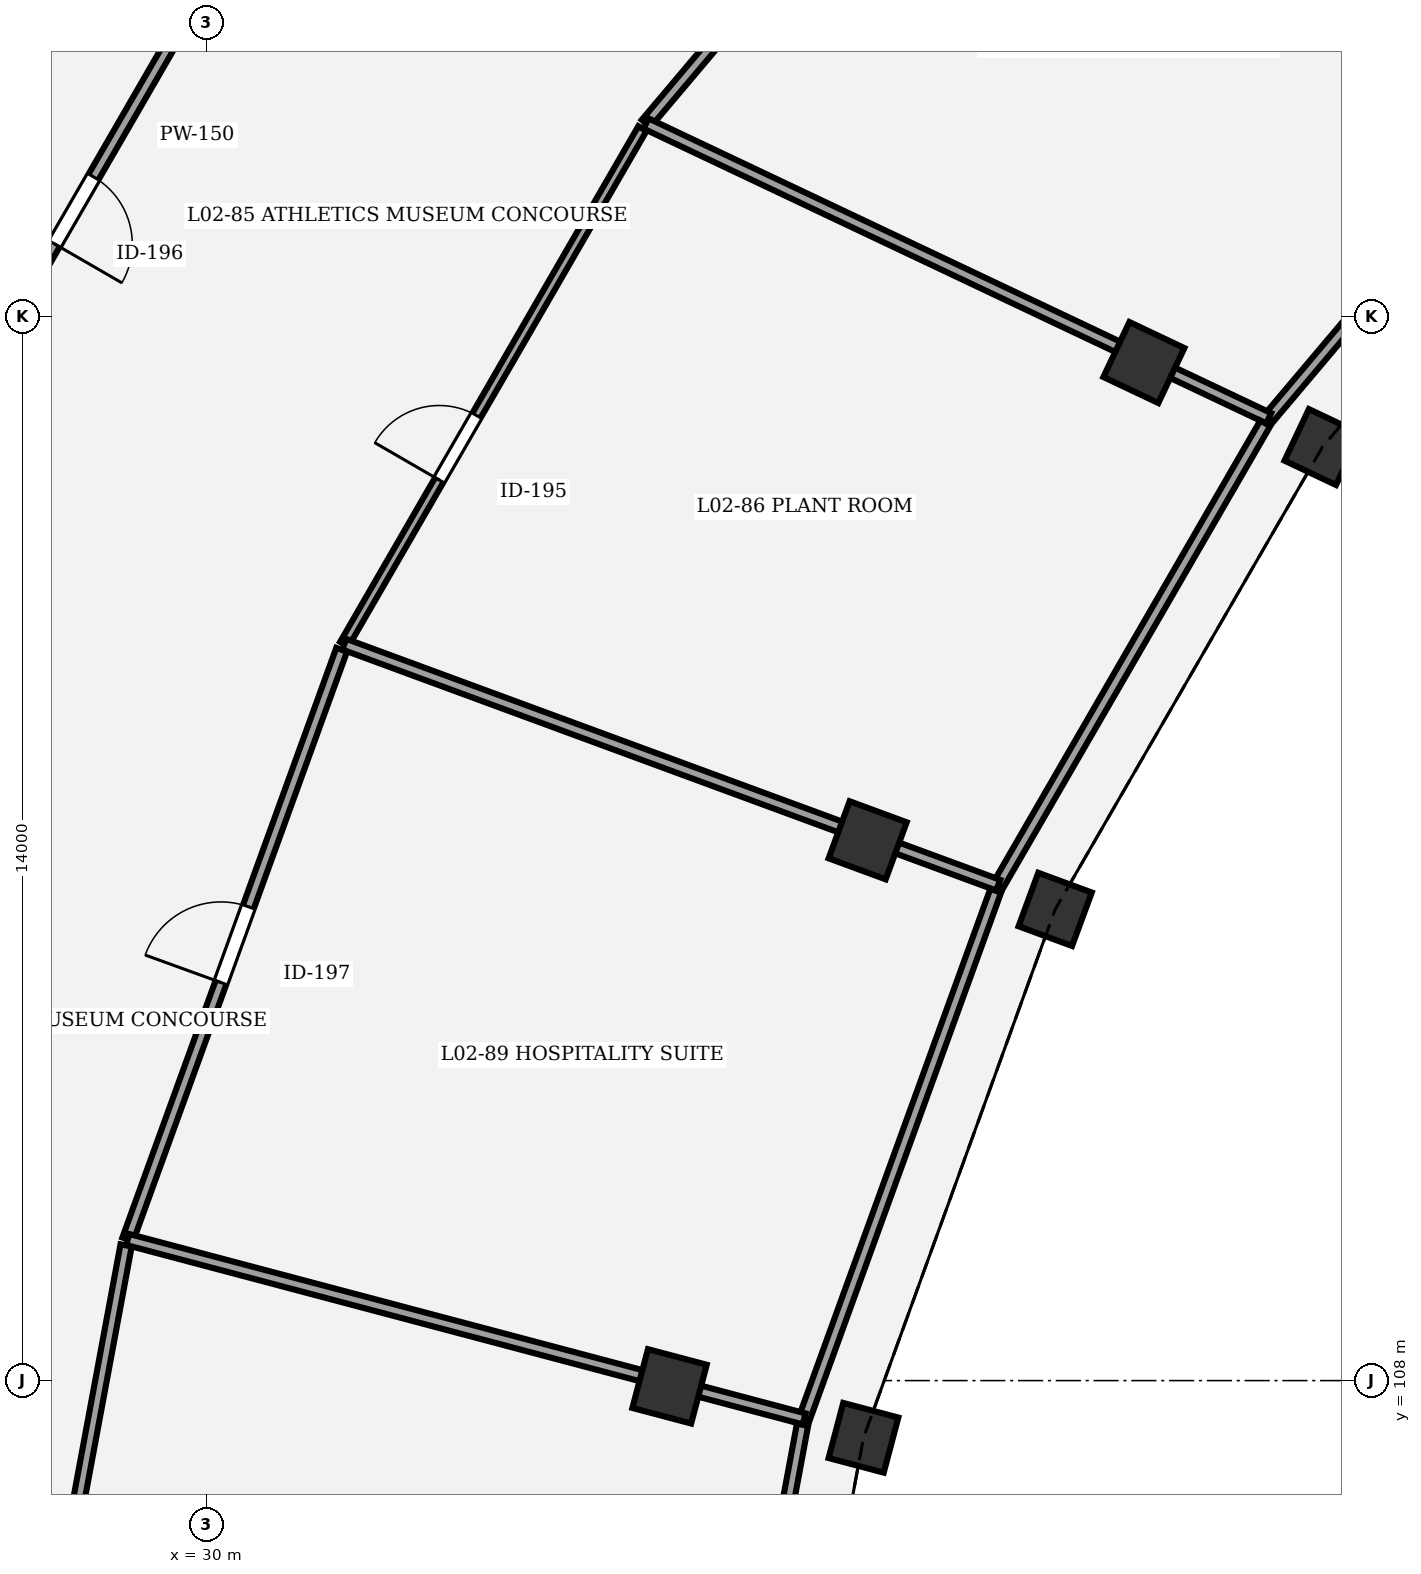
"""IFC4 building model, lengths in metres.
Left out: names, types, materials, properties, quantities, classifications, styles, units other than length and angle.
Written with IfcOpenShell. Run it as: python <this file> out.ifc"""

import sys

from ifc_helpers import new_model, si_unit, direction, frame, frame_2d, origin, origin_2d, place, context, subcontext, project, spatial, rectangle, extrude, element, fill, save


model = new_model("IFC4")
c1 = context("Model", 3, precision=1e-05, world=origin(), true_north=direction((0.0, 1.0)))
c2 = subcontext(c1, "Body", "Model", "MODEL_VIEW")
j1 = project(units=[si_unit("LENGTHUNIT", "METRE"), si_unit("PLANEANGLEUNIT", "RADIAN")], contexts=[c1])
p1 = place(None, origin())
s1 = spatial("IfcSite", under=j1, at=p1, CompositionType="ELEMENT")
p2 = place(p1, origin())
s2 = spatial("IfcBuilding", under=s1, at=p2, CompositionType="ELEMENT")
p3 = place(p2, frame((0.0, 0.0, 10.2)))
s3 = spatial("IfcBuildingStorey", under=s2, at=p3, CompositionType="ELEMENT", Elevation=10.2)
p4 = place(p3, frame((44.687, 120.281, 0.0), z_axis=(0.0, 0.0, 1.0), x_axis=(-0.903858661687, 0.4278311813, 0.0)))
e1 = element("IfcColumn", 1, at=p4, inside=s3, PredefinedType="COLUMN", context=c2, shape_type="SweptSolid", body=[
    extrude(rectangle(XDim=0.75, YDim=0.75, at=origin_2d()), origin(), (0.0, 0.0, 1.0), 4.5),
])
p5 = place(p3, frame((42.337, 121.394, 0.0), z_axis=(0.0, 0.0, 1.0), x_axis=(-0.903858661687, 0.4278311813, 0.0)))
e2 = element("IfcColumn", 2, at=p5, inside=s3, PredefinedType="COLUMN", context=c2, shape_type="SweptSolid", body=[
    extrude(rectangle(XDim=0.8, YDim=0.8, at=origin_2d()), origin(), (0.0, 0.0, 1.0), 4.5),
])
p6 = place(p3, frame((41.17, 114.199, 0.0), z_axis=(0.0, 0.0, 1.0), x_axis=(-0.938372433776, 0.34562577382, 0.0)))
e3 = element("IfcColumn", 3, at=p6, inside=s3, PredefinedType="COLUMN", context=c2, shape_type="SweptSolid", body=[
    extrude(rectangle(XDim=0.75, YDim=0.75, at=origin_2d()), origin(), (0.0, 0.0, 1.0), 4.5),
])
p7 = place(p3, frame((38.703, 115.108, 0.0), z_axis=(0.0, 0.0, 1.0), x_axis=(-0.938372433776, 0.34562577382, 0.0)))
e4 = element("IfcColumn", 4, at=p7, inside=s3, PredefinedType="COLUMN", context=c2, shape_type="SweptSolid", body=[
    extrude(rectangle(XDim=0.8, YDim=0.8, at=origin_2d()), origin(), (0.0, 0.0, 1.0), 4.5),
])
p8 = place(p3, frame((38.648, 107.248, 0.0), z_axis=(0.0, 0.0, 1.0), x_axis=(-0.966600102017, 0.256289373133, 0.0)))
e5 = element("IfcColumn", 5, at=p8, inside=s3, PredefinedType="COLUMN", context=c2, shape_type="SweptSolid", body=[
    extrude(rectangle(XDim=0.75, YDim=0.75, at=origin_2d()), origin(), (0.0, 0.0, 1.0), 4.5),
])
p9 = place(p3, frame((36.097, 107.924, 0.0), z_axis=(0.0, 0.0, 1.0), x_axis=(-0.966600102017, 0.256289373133, 0.0)))
e6 = element("IfcColumn", 6, at=p9, inside=s3, PredefinedType="COLUMN", context=c2, shape_type="SweptSolid", body=[
    extrude(rectangle(XDim=0.8, YDim=0.8, at=origin_2d()), origin(), (0.0, 0.0, 1.0), 4.5),
])
p10 = place(p3, frame((35.788, 124.538, 0.0), z_axis=(0.0, 0.0, 1.0), x_axis=(0.645180817826, 0.764029915847, 0.0)))
e7 = element("IfcWall", 7, at=p10, inside=s3, PredefinedType="PARTITIONING", context=c2, shape_type="SweptSolid", body=[
    extrude(rectangle(XDim=7.779, YDim=0.15, at=frame_2d((3.89, 0.0))), origin(), (0.0, 0.0, 1.0), 3.25),
])
p11 = place(p10, frame((2.504, 0.0, 0.0)))
e8 = element("IfcOpeningElement", 8, at=p11, cuts=e7, PredefinedType="OPENING", context=c2, shape_type="SweptSolid", body=[
    extrude(rectangle(XDim=0.9, YDim=2.2, at=frame_2d((0.45, 1.1))), frame((0.0, 0.085, 0.0), z_axis=(0.0, -1.0, 0.0), x_axis=(1.0, 0.0, 0.0)), (0.0, 0.0, 1.0), 0.17),
])
p12 = place(p3, frame((31.817, 117.688, 0.0), z_axis=(0.0, 0.0, 1.0), x_axis=(0.500584301803, 0.865687794063, 0.0)))
e9 = element("IfcWall", 9, at=p12, inside=s3, PredefinedType="PARTITIONING", context=c2, shape_type="SweptSolid", body=[
    extrude(rectangle(XDim=7.837, YDim=0.125, at=frame_2d((3.918, 0.0))), origin(), (0.0, 0.0, 1.0), 3.25),
])
p13 = place(p12, frame((2.496, 0.0, 0.0)))
e10 = element("IfcOpeningElement", 10, at=p13, cuts=e9, PredefinedType="OPENING", context=c2, shape_type="SweptSolid", body=[
    extrude(rectangle(XDim=0.98, YDim=2.2, at=frame_2d((0.49, 1.1))), frame((0.0, 0.073, 0.0), z_axis=(0.0, -1.0, 0.0), x_axis=(1.0, 0.0, 0.0)), (0.0, 0.0, 1.0), 0.145),
])
p14 = place(p3, frame((30.359, 127.019, 0.0), z_axis=(0.0, 0.0, 1.0), x_axis=(-0.500559280672, -0.865702262059, 0.0)))
e11 = element("IfcWall", 11, at=p14, inside=s3, PredefinedType="PARTITIONING", context=c2, shape_type="SweptSolid", body=[
    extrude(rectangle(XDim=8.375, YDim=0.15, at=frame_2d((4.187, 0.0))), origin(), (0.0, 0.0, 1.0), 3.25),
])
p15 = place(p14, frame((3.677, 0.0, 0.0)))
e12 = element("IfcOpeningElement", 12, at=p15, cuts=e11, PredefinedType="OPENING", context=c2, shape_type="SweptSolid", body=[
    extrude(rectangle(XDim=1.02, YDim=2.2, at=frame_2d((0.51, 1.1))), frame((0.0, 0.085, 0.0), z_axis=(0.0, -1.0, 0.0), x_axis=(1.0, 0.0, 0.0)), (0.0, 0.0, 1.0), 0.17),
])
p16 = place(p3, frame((28.968, 109.856, 0.0), z_axis=(0.0, 0.0, 1.0), x_axis=(0.341044733968, 0.940047067669, 0.0)))
e13 = element("IfcWall", 13, at=p16, inside=s3, PredefinedType="PARTITIONING", context=c2, shape_type="SweptSolid", body=[
    extrude(rectangle(XDim=8.254, YDim=0.15, at=frame_2d((4.127, 0.0))), origin(), (0.0, 0.0, 1.0), 3.25),
])
p17 = place(p16, frame((3.597, 0.0, 0.0)))
e14 = element("IfcOpeningElement", 14, at=p17, cuts=e13, PredefinedType="OPENING", context=c2, shape_type="SweptSolid", body=[
    extrude(rectangle(XDim=1.06, YDim=2.2, at=frame_2d((0.53, 1.1))), frame((0.0, 0.085, 0.0), z_axis=(0.0, -1.0, 0.0), x_axis=(1.0, 0.0, 0.0)), (0.0, 0.0, 1.0), 0.17),
])
p18 = place(p3, frame((27.251, 100.651, 0.0), z_axis=(0.0, 0.0, 1.0), x_axis=(0.182600545941, 0.983187184936, 0.0)))
e15 = element("IfcWall", 15, at=p18, inside=s3, PredefinedType="PARTITIONING", context=c2, shape_type="SweptSolid", body=[
    extrude(rectangle(XDim=9.284, YDim=0.15, at=frame_2d((4.642, 0.0))), origin(), (0.0, 0.0, 1.0), 3.25),
])
p19 = place(p18, frame((4.072, 0.0, 0.0)))
e16 = element("IfcOpeningElement", 16, at=p19, cuts=e15, PredefinedType="OPENING", context=c2, shape_type="SweptSolid", body=[
    extrude(rectangle(XDim=1.14, YDim=2.2, at=frame_2d((0.57, 1.1))), frame((0.0, 0.085, 0.0), z_axis=(0.0, -1.0, 0.0), x_axis=(1.0, 0.0, 0.0)), (0.0, 0.0, 1.0), 0.17),
])
p20 = place(p3, frame((48.475, 125.983, 0.0), z_axis=(0.0, 0.0, 1.0), x_axis=(-0.64516899819, -0.764039896716, 0.0)))
e17 = element("IfcWall", 17, at=p20, inside=s3, PredefinedType="PARTITIONING", context=c2, shape_type="SweptSolid", body=[
    extrude(rectangle(XDim=6.967, YDim=0.15, at=frame_2d((3.483, 0.0))), origin(), (0.0, 0.0, 1.0), 3.25),
])
p21 = place(p3, frame((43.98, 120.66, 0.0), z_axis=(0.0, 0.0, 1.0), x_axis=(-0.903857372861, 0.427833904132, 0.0)))
e18 = element("IfcWall", 18, at=p21, inside=s3, PredefinedType="PARTITIONING", context=c2, shape_type="SweptSolid", body=[
    extrude(rectangle(XDim=9.063, YDim=0.15, at=frame_2d((4.532, 0.0))), origin(), (0.0, 0.0, 1.0), 3.25),
])
p22 = place(p3, frame((43.934, 120.594, 0.0), z_axis=(0.0, 0.0, 1.0), x_axis=(-0.500549390525, -0.865707980583, 0.0)))
e19 = element("IfcWall", 19, at=p22, inside=s3, PredefinedType="PARTITIONING", context=c2, shape_type="SweptSolid", body=[
    extrude(rectangle(XDim=7.018, YDim=0.15, at=frame_2d((3.509, 0.0))), origin(), (0.0, 0.0, 1.0), 3.25),
])
p23 = place(p3, frame((40.421, 114.518, 0.0), z_axis=(0.0, 0.0, 1.0), x_axis=(-0.938348571445, 0.345690553049, 0.0)))
e20 = element("IfcWall", 20, at=p23, inside=s3, PredefinedType="PARTITIONING", context=c2, shape_type="SweptSolid", body=[
    extrude(rectangle(XDim=9.17, YDim=0.15, at=frame_2d((4.585, 0.0))), origin(), (0.0, 0.0, 1.0), 3.25),
])
p24 = place(p3, frame((40.388, 114.445, 0.0), z_axis=(0.0, 0.0, 1.0), x_axis=(-0.34104817416, -0.940045819576, 0.0)))
e21 = element("IfcWall", 21, at=p24, inside=s3, PredefinedType="PARTITIONING", context=c2, shape_type="SweptSolid", body=[
    extrude(rectangle(XDim=7.392, YDim=0.15, at=frame_2d((3.696, 0.0))), origin(), (0.0, 0.0, 1.0), 3.25),
])
p25 = place(p3, frame((37.867, 107.496, 0.0), z_axis=(0.0, 0.0, 1.0), x_axis=(-0.96658744027, 0.256337122383, 0.0)))
e22 = element("IfcWall", 22, at=p25, inside=s3, PredefinedType="PARTITIONING", context=c2, shape_type="SweptSolid", body=[
    extrude(rectangle(XDim=9.207, YDim=0.15, at=frame_2d((4.604, 0.0))), origin(), (0.0, 0.0, 1.0), 3.25),
])
p26 = place(p3, frame((37.846, 107.419, 0.0), z_axis=(0.0, 0.0, 1.0), x_axis=(-0.182614898171, -0.983184519287, 0.0)))
e23 = element("IfcWall", 23, at=p26, inside=s3, PredefinedType="PARTITIONING", context=c2, shape_type="SweptSolid", body=[
    extrude(rectangle(XDim=8.316, YDim=0.15, at=frame_2d((4.158, 0.0))), origin(), (0.0, 0.0, 1.0), 3.25),
])
p27 = place(p13, origin())
e24 = element("IfcDoor", 24, at=p27, inside=s3, OperationType="SINGLE_SWING_LEFT", PredefinedType="DOOR", context=c2, shape_type="SweptSolid", body=[
    extrude(rectangle(XDim=0.98, YDim=2.2, at=frame_2d((0.49, 1.1))), frame((0.0, 0.025, 0.0), z_axis=(0.0, -1.0, 0.0), x_axis=(1.0, 0.0, 0.0)), (0.0, 0.0, 1.0), 0.05),
])
fill(e10, e24)
p28 = place(p15, origin())
e25 = element("IfcDoor", 25, at=p28, inside=s3, OperationType="SINGLE_SWING_RIGHT", PredefinedType="DOOR", context=c2, shape_type="SweptSolid", body=[
    extrude(rectangle(XDim=1.02, YDim=2.2, at=frame_2d((0.51, 1.1))), frame((0.0, 0.025, 0.0), z_axis=(0.0, -1.0, 0.0), x_axis=(1.0, 0.0, 0.0)), (0.0, 0.0, 1.0), 0.05),
])
fill(e12, e25)
p29 = place(p17, origin())
e26 = element("IfcDoor", 26, at=p29, inside=s3, OperationType="SINGLE_SWING_LEFT", PredefinedType="DOOR", context=c2, shape_type="SweptSolid", body=[
    extrude(rectangle(XDim=1.06, YDim=2.2, at=frame_2d((0.53, 1.1))), frame((0.0, 0.025, 0.0), z_axis=(0.0, -1.0, 0.0), x_axis=(1.0, 0.0, 0.0)), (0.0, 0.0, 1.0), 0.05),
])
fill(e14, e26)
save(model, sys.argv[1])
